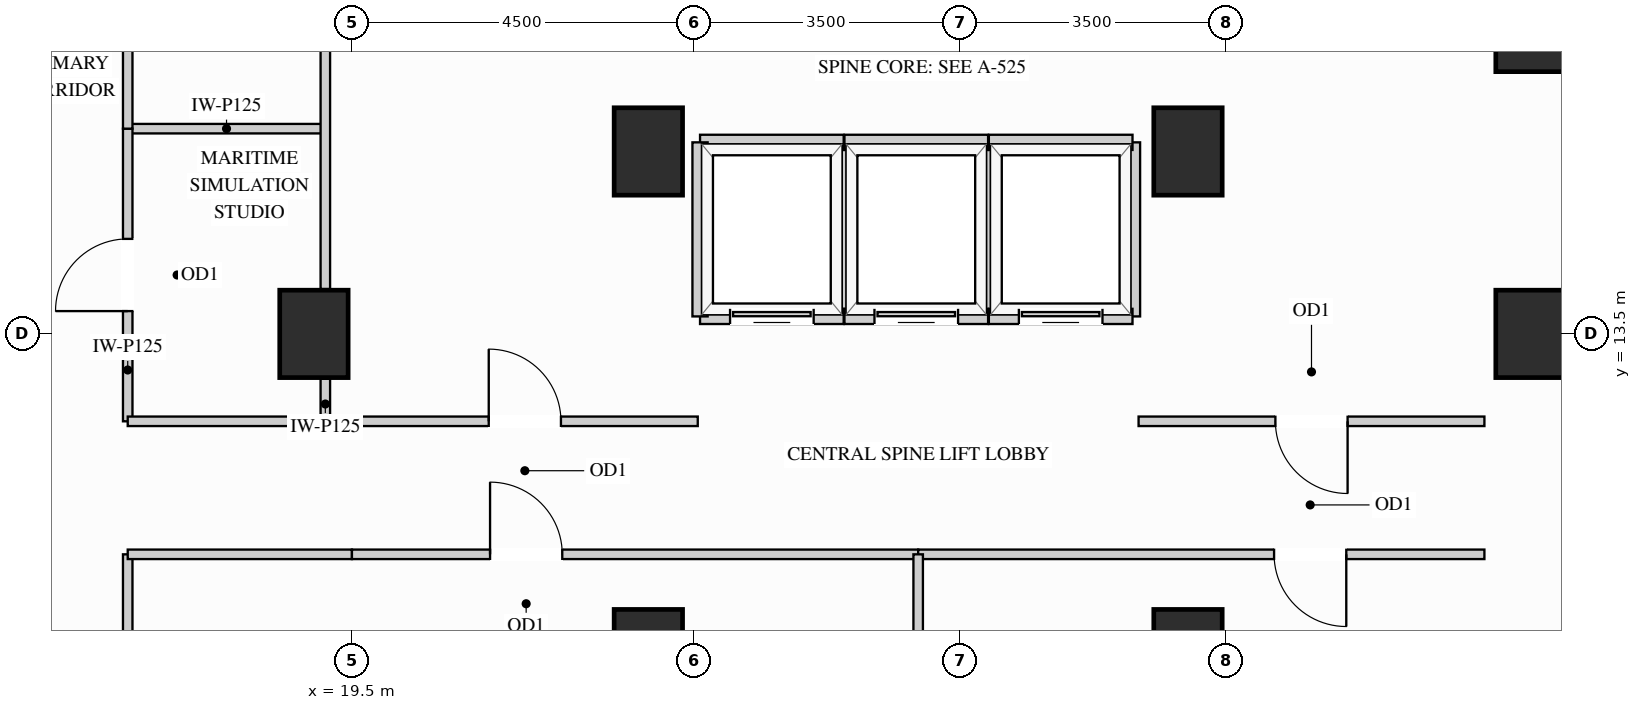
"""IFC4 building model, lengths in metres.
Left out: names, types, materials, properties, quantities, classifications, styles, units other than length and angle.
Written with IfcOpenShell. Run it as: python <this file> out.ifc"""

import sys

from ifc_helpers import new_model, si_unit, direction, frame, frame_2d, origin, origin_2d, place, context, subcontext, project, spatial, rectangle, extrude, source, transform, mapped, element, fill, save


model = new_model("IFC4")
c1 = context("Model", 3, precision=1e-05, world=origin(), true_north=direction((0.0, 1.0)))
c2 = subcontext(c1, "Body", "Model", "MODEL_VIEW")
j1 = project(units=[si_unit("LENGTHUNIT", "METRE"), si_unit("PLANEANGLEUNIT", "RADIAN")], contexts=[c1])
p1 = place(None, origin())
s1 = spatial("IfcSite", under=j1, at=p1, CompositionType="ELEMENT")
p2 = place(p1, origin())
s2 = spatial("IfcBuilding", under=s1, at=p2, CompositionType="ELEMENT")
p3 = place(p2, frame((0.0, 0.0, 127.8)))
s3 = spatial("IfcBuildingStorey", under=s2, at=p3, CompositionType="ELEMENT", Elevation=127.8)
m1 = source(origin(), c2, "Body", "SweptSolid", [
    extrude(rectangle(XDim=0.9, YDim=0.9, at=origin_2d()), origin(), (0.0, 0.0, 1.0), 3.38),
])
p4 = place(p3, frame((35.0, 17.4, 0.0), z_axis=(0.0, 0.0, 1.0), x_axis=(1.0, 0.0, 0.0)))
e1 = element("IfcColumn", 1, at=p4, inside=s3, PredefinedType="COLUMN", context=c2, shape_type="MappedRepresentation", body=[
    mapped(m1, transform((0.0, 0.0, 0.0), x_axis=(1.0, 0.0, 0.0), y_axis=(0.0, 1.0, 0.0), z_axis=(0.0, 0.0, 1.0))),
])
m2 = source(origin(), c2, "Body", "SweptSolid", [
    extrude(rectangle(XDim=0.9, YDim=1.15, at=origin_2d()), origin(), (0.0, 0.0, 1.0), 3.38),
])
for number, where, z_axis, x_axis in (
    (2, (19.0, 13.5, 0.0), (0.0, 0.0, 1.0), (1.0, 0.0, 0.0)),
    (3, (35.0, 13.5, 0.0), (0.0, 0.0, 1.0), (1.0, 0.0, 0.0)),
    (4, (23.4, 15.9, 0.0), (0.0, 0.0, 1.0), (1.0, 0.0, 0.0)),
    (5, (23.4, 9.3, 0.0), (0.0, 0.0, 1.0), (1.0, 0.0, 0.0)),
    (6, (30.5, 15.9, 0.0), (0.0, 0.0, 1.0), (1.0, 0.0, 0.0)),
    (7, (30.5, 9.3, 0.0), (0.0, 0.0, 1.0), (1.0, 0.0, 0.0)),
):
    element("IfcColumn", number, at=place(p3, frame(where, z_axis=z_axis, x_axis=x_axis)), inside=s3, PredefinedType="COLUMN", context=c2, shape_type="MappedRepresentation", body=[
        mapped(m2, transform((0.0, 0.0, 0.0), x_axis=(1.0, 0.0, 0.0), y_axis=(0.0, 1.0, 0.0), z_axis=(0.0, 0.0, 1.0))),
    ])
m3 = source(origin(), c2, "Body", "SweptSolid", [
    extrude(rectangle(XDim=2.6, YDim=0.125, at=frame_2d((1.3, 0.0))), origin(), (0.0, 0.0, 1.0), 3.365),
])
p5 = place(p3, frame((16.55, 16.2, 0.0), z_axis=(0.0, 0.0, 1.0), x_axis=(1.0, 0.0, 0.0)))
e8 = element("IfcWall", 8, at=p5, inside=s3, PredefinedType="PARTITIONING", context=c2, shape_type="MappedRepresentation", body=[
    mapped(m3, transform((0.0, 0.0, 0.0), x_axis=(1.0, 0.0, 0.0), y_axis=(0.0, 1.0, 0.0), z_axis=(0.0, 0.0, 1.0))),
])
m4 = source(origin(), c2, "Body", "SweptSolid", [
    extrude(rectangle(XDim=0.56, YDim=0.125, at=frame_2d((0.28, 0.0))), origin(), (0.0, 0.0, 1.0), 2.677),
])
p6 = place(p3, frame((19.15, 12.35, 0.0), z_axis=(0.0, 0.0, 1.0), x_axis=(0.0, 1.0, 0.0)))
e9 = element("IfcWall", 9, at=p6, inside=s3, PredefinedType="PARTITIONING", context=c2, shape_type="MappedRepresentation", body=[
    mapped(m4, transform((0.0, 0.0, 0.0), x_axis=(1.0, 0.0, 0.0), y_axis=(0.0, 1.0, 0.0), z_axis=(0.0, 0.0, 1.0))),
])
m5 = source(origin(), c2, "Body", "SweptSolid", [
    extrude(rectangle(XDim=3.32, YDim=0.125, at=frame_2d((1.66, 0.0))), origin(), (0.0, 0.0, 1.0), 2.677),
])
p7 = place(p3, frame((19.15, 14.09, 0.0), z_axis=(0.0, 0.0, 1.0), x_axis=(0.0, 1.0, 0.0)))
e10 = element("IfcWall", 10, at=p7, inside=s3, PredefinedType="PARTITIONING", context=c2, shape_type="MappedRepresentation", body=[
    mapped(m5, transform((0.0, 0.0, 0.0), x_axis=(1.0, 0.0, 0.0), y_axis=(0.0, 1.0, 0.0), z_axis=(0.0, 0.0, 1.0))),
])
p8 = place(p3, frame((16.55, 12.35, 0.0), z_axis=(0.0, 0.0, 1.0), x_axis=(0.0, 1.0, 0.0)))
e11 = element("IfcWall", 11, at=p8, inside=s3, PredefinedType="PARTITIONING", context=c2, shape_type="SweptSolid", body=[
    extrude(rectangle(XDim=3.85, YDim=0.125, at=frame_2d((1.925, 0.0))), origin(), (0.0, 0.0, 1.0), 3.365),
])
p9 = place(p8, frame((1.45, 0.0, 0.0)))
e12 = element("IfcOpeningElement", 12, at=p9, cuts=e11, PredefinedType="OPENING", context=c2, shape_type="SweptSolid", body=[
    extrude(rectangle(XDim=0.95, YDim=2.15, at=frame_2d((0.475, 1.075))), frame((0.0, 0.073, 0.0), z_axis=(0.0, -1.0, 0.0), x_axis=(1.0, 0.0, 0.0)), (0.0, 0.0, 1.0), 0.145),
])
p10 = place(p3, frame((16.55, 16.2, 0.0), z_axis=(0.0, 0.0, 1.0), x_axis=(0.0, 1.0, 0.0)))
e13 = element("IfcWall", 13, at=p10, inside=s3, PredefinedType="PARTITIONING", context=c2, shape_type="SweptSolid", body=[
    extrude(rectangle(XDim=7.15, YDim=0.125, at=frame_2d((3.575, 0.0))), origin(), (0.0, 0.0, 1.0), 3.365),
])
p11 = place(p10, frame((3.1, 0.0, 0.0)))
e14 = element("IfcOpeningElement", 14, at=p11, cuts=e13, PredefinedType="OPENING", context=c2, shape_type="SweptSolid", body=[
    extrude(rectangle(XDim=0.95, YDim=2.15, at=frame_2d((0.475, 1.075))), frame((0.0, 0.073, 0.0), z_axis=(0.0, -1.0, 0.0), x_axis=(1.0, 0.0, 0.0)), (0.0, 0.0, 1.0), 0.145),
])
p12 = place(p3, frame((16.55, 4.65, 0.0), z_axis=(0.0, 0.0, 1.0), x_axis=(0.0, 1.0, 0.0)))
e15 = element("IfcWall", 15, at=p12, inside=s3, PredefinedType="PARTITIONING", context=c2, shape_type="SweptSolid", body=[
    extrude(rectangle(XDim=5.95, YDim=0.125, at=frame_2d((2.975, 0.0))), origin(), (0.0, 0.0, 1.0), 3.365),
])
p13 = place(p12, frame((2.5, 0.0, 0.0)))
e16 = element("IfcOpeningElement", 16, at=p13, cuts=e15, PredefinedType="OPENING", context=c2, shape_type="SweptSolid", body=[
    extrude(rectangle(XDim=0.95, YDim=2.15, at=frame_2d((0.475, 1.075))), frame((0.0, 0.073, 0.0), z_axis=(0.0, -1.0, 0.0), x_axis=(1.0, 0.0, 0.0)), (0.0, 0.0, 1.0), 0.145),
])
p14 = place(p3, frame((29.85, 12.35, 0.0), z_axis=(0.0, 0.0, 1.0), x_axis=(1.0, 0.0, 0.0)))
e17 = element("IfcWall", 17, at=p14, inside=s3, PredefinedType="PARTITIONING", context=c2, shape_type="SweptSolid", body=[
    extrude(rectangle(XDim=4.55, YDim=0.125, at=frame_2d((2.275, 0.0))), origin(), (0.0, 0.0, 1.0), 3.365),
])
p15 = place(p14, frame((1.8, 0.0, 0.0)))
e18 = element("IfcOpeningElement", 18, at=p15, cuts=e17, PredefinedType="OPENING", context=c2, shape_type="SweptSolid", body=[
    extrude(rectangle(XDim=0.95, YDim=2.15, at=frame_2d((0.475, 1.075))), frame((0.0, 0.073, 0.0), z_axis=(0.0, -1.0, 0.0), x_axis=(1.0, 0.0, 0.0)), (0.0, 0.0, 1.0), 0.145),
])
m6 = source(origin(), c2, "Body", "SweptSolid", [
    extrude(rectangle(XDim=2.95, YDim=0.125, at=frame_2d((1.475, 0.0))), origin(), (0.0, 0.0, 1.0), 3.365),
])
p16 = place(p3, frame((16.55, 12.35, 0.0), z_axis=(0.0, 0.0, 1.0), x_axis=(1.0, 0.0, 0.0)))
e19 = element("IfcWall", 19, at=p16, inside=s3, PredefinedType="PARTITIONING", context=c2, shape_type="MappedRepresentation", body=[
    mapped(m6, transform((0.0, 0.0, 0.0), x_axis=(1.0, 0.0, 0.0), y_axis=(0.0, 1.0, 0.0), z_axis=(0.0, 0.0, 1.0))),
])
p17 = place(p3, frame((19.5, 12.35, 0.0), z_axis=(0.0, 0.0, 1.0), x_axis=(1.0, 0.0, 0.0)))
e20 = element("IfcWall", 20, at=p17, inside=s3, PredefinedType="PARTITIONING", context=c2, shape_type="SweptSolid", body=[
    extrude(rectangle(XDim=4.55, YDim=0.125, at=frame_2d((2.275, 0.0))), origin(), (0.0, 0.0, 1.0), 3.365),
])
p18 = place(p17, frame((1.8, 0.0, 0.0)))
e21 = element("IfcOpeningElement", 21, at=p18, cuts=e20, PredefinedType="OPENING", context=c2, shape_type="SweptSolid", body=[
    extrude(rectangle(XDim=0.95, YDim=2.15, at=frame_2d((0.475, 1.075))), frame((0.0, 0.073, 0.0), z_axis=(0.0, -1.0, 0.0), x_axis=(1.0, 0.0, 0.0)), (0.0, 0.0, 1.0), 0.145),
])
p19 = place(p3, frame((16.55, 10.6, 0.0), z_axis=(0.0, 0.0, 1.0), x_axis=(1.0, 0.0, 0.0)))
e22 = element("IfcWall", 22, at=p19, inside=s3, PredefinedType="PARTITIONING", context=c2, shape_type="MappedRepresentation", body=[
    mapped(m6, transform((0.0, 0.0, 0.0), x_axis=(1.0, 0.0, 0.0), y_axis=(0.0, 1.0, 0.0), z_axis=(0.0, 0.0, 1.0))),
])
p20 = place(p3, frame((19.5, 10.6, 0.0), z_axis=(0.0, 0.0, 1.0), x_axis=(1.0, 0.0, 0.0)))
e23 = element("IfcWall", 23, at=p20, inside=s3, PredefinedType="PARTITIONING", context=c2, shape_type="SweptSolid", body=[
    extrude(rectangle(XDim=7.45, YDim=0.125, at=frame_2d((3.725, 0.0))), origin(), (0.0, 0.0, 1.0), 3.365),
])
p21 = place(p20, frame((1.817, 0.0, 0.0)))
e24 = element("IfcOpeningElement", 24, at=p21, cuts=e23, PredefinedType="OPENING", context=c2, shape_type="SweptSolid", body=[
    extrude(rectangle(XDim=0.95, YDim=2.15, at=frame_2d((0.475, 1.075))), frame((0.0, 0.073, 0.0), z_axis=(0.0, -1.0, 0.0), x_axis=(1.0, 0.0, 0.0)), (0.0, 0.0, 1.0), 0.145),
])
p22 = place(p3, frame((26.95, 10.6, 0.0), z_axis=(0.0, 0.0, 1.0), x_axis=(1.0, 0.0, 0.0)))
e25 = element("IfcWall", 25, at=p22, inside=s3, PredefinedType="PARTITIONING", context=c2, shape_type="SweptSolid", body=[
    extrude(rectangle(XDim=7.45, YDim=0.125, at=frame_2d((3.725, 0.0))), origin(), (0.0, 0.0, 1.0), 3.365),
])
p23 = place(p22, frame((4.683, 0.0, 0.0)))
e26 = element("IfcOpeningElement", 26, at=p23, cuts=e25, PredefinedType="OPENING", context=c2, shape_type="SweptSolid", body=[
    extrude(rectangle(XDim=0.95, YDim=2.15, at=frame_2d((0.475, 1.075))), frame((0.0, 0.073, 0.0), z_axis=(0.0, -1.0, 0.0), x_axis=(1.0, 0.0, 0.0)), (0.0, 0.0, 1.0), 0.145),
])
m7 = source(origin(), c2, "Body", "SweptSolid", [
    extrude(rectangle(XDim=1.748, YDim=0.125, at=frame_2d((0.874, 0.0))), origin(), (0.0, 0.0, 1.0), 3.365),
])
p24 = place(p3, frame((26.95, 8.852, 0.0), z_axis=(0.0, 0.0, 1.0), x_axis=(0.0, 1.0, 0.0)))
e27 = element("IfcWall", 27, at=p24, inside=s3, PredefinedType="PARTITIONING", context=c2, shape_type="MappedRepresentation", body=[
    mapped(m7, transform((0.0, 0.0, 0.0), x_axis=(1.0, 0.0, 0.0), y_axis=(0.0, 1.0, 0.0), z_axis=(0.0, 0.0, 1.0))),
])
m8 = source(origin(), c2, "Body", "SweptSolid", [
    extrude(rectangle(XDim=2.29, YDim=0.2, at=frame_2d((1.145, 0.0))), origin(), (0.0, 0.0, 1.0), 3.365),
])
p25 = place(p3, frame((25.97, 13.73, 0.0), z_axis=(0.0, 0.0, 1.0), x_axis=(0.0, 1.0, 0.0)))
e28 = element("IfcWall", 28, at=p25, inside=s3, PredefinedType="PARTITIONING", context=c2, shape_type="MappedRepresentation", body=[
    mapped(m8, transform((0.0, 0.0, 0.0), x_axis=(1.0, 0.0, 0.0), y_axis=(0.0, 1.0, 0.0), z_axis=(0.0, 0.0, 1.0))),
])
m9 = source(origin(), c2, "Body", "SweptSolid", [
    extrude(rectangle(XDim=1.89, YDim=0.2, at=frame_2d((0.945, 0.0))), origin(), (0.0, 0.0, 1.0), 2.677),
])
p26 = place(p3, frame((24.08, 16.02, 0.0), z_axis=(0.0, 0.0, 1.0), x_axis=(1.0, 0.0, 0.0)))
e29 = element("IfcWall", 29, at=p26, inside=s3, PredefinedType="PARTITIONING", context=c2, shape_type="MappedRepresentation", body=[
    mapped(m9, transform((0.0, 0.0, 0.0), x_axis=(1.0, 0.0, 0.0), y_axis=(0.0, 1.0, 0.0), z_axis=(0.0, 0.0, 1.0))),
])
p27 = place(p3, frame((24.08, 13.73, 0.0), z_axis=(0.0, 0.0, 1.0), x_axis=(1.0, 0.0, 0.0)))
e30 = element("IfcWall", 30, at=p27, inside=s3, PredefinedType="PARTITIONING", context=c2, shape_type="SweptSolid", body=[
    extrude(rectangle(XDim=1.89, YDim=0.2, at=frame_2d((0.945, 0.0))), origin(), (0.0, 0.0, 1.0), 2.446),
])
p28 = place(p27, frame((0.395, 0.0, 0.0)))
e31 = element("IfcOpeningElement", 31, at=p28, cuts=e30, PredefinedType="OPENING", context=c2, shape_type="SweptSolid", body=[
    extrude(rectangle(XDim=1.1, YDim=2.2, at=frame_2d((0.55, 1.1))), frame((0.0, 0.11, 0.0), z_axis=(0.0, -1.0, 0.0), x_axis=(1.0, 0.0, 0.0)), (0.0, 0.0, 1.0), 0.22),
])
for number, where, z_axis, x_axis in (
    (32, (24.08, 13.73, 0.0), (0.0, 0.0, 1.0), (0.0, 1.0, 0.0)),
    (33, (27.87, 13.73, 0.0), (0.0, 0.0, 1.0), (0.0, 1.0, 0.0)),
):
    element("IfcWall", number, at=place(p3, frame(where, z_axis=z_axis, x_axis=x_axis)), inside=s3, PredefinedType="PARTITIONING", context=c2, shape_type="MappedRepresentation", body=[
        mapped(m8, transform((0.0, 0.0, 0.0), x_axis=(1.0, 0.0, 0.0), y_axis=(0.0, 1.0, 0.0), z_axis=(0.0, 0.0, 1.0))),
    ])
m10 = source(origin(), c2, "Body", "SweptSolid", [
    extrude(rectangle(XDim=1.89, YDim=0.2, at=frame_2d((0.945, 0.0))), origin(), (0.0, 0.0, 1.0), 2.677),
])
p29 = place(p3, frame((25.98, 16.02, 0.0), z_axis=(0.0, 0.0, 1.0), x_axis=(1.0, 0.0, 0.0)))
e34 = element("IfcWall", 34, at=p29, inside=s3, PredefinedType="PARTITIONING", context=c2, shape_type="MappedRepresentation", body=[
    mapped(m10, transform((0.0, 0.0, 0.0), x_axis=(1.0, 0.0, 0.0), y_axis=(0.0, 1.0, 0.0), z_axis=(0.0, 0.0, 1.0))),
])
p30 = place(p3, frame((25.98, 13.73, 0.0), z_axis=(0.0, 0.0, 1.0), x_axis=(1.0, 0.0, 0.0)))
e35 = element("IfcWall", 35, at=p30, inside=s3, PredefinedType="PARTITIONING", context=c2, shape_type="SweptSolid", body=[
    extrude(rectangle(XDim=1.89, YDim=0.2, at=frame_2d((0.945, 0.0))), origin(), (0.0, 0.0, 1.0), 2.446),
])
p31 = place(p30, frame((0.395, 0.0, 0.0)))
e36 = element("IfcOpeningElement", 36, at=p31, cuts=e35, PredefinedType="OPENING", context=c2, shape_type="SweptSolid", body=[
    extrude(rectangle(XDim=1.1, YDim=2.2, at=frame_2d((0.55, 1.1))), frame((0.0, 0.11, 0.0), z_axis=(0.0, -1.0, 0.0), x_axis=(1.0, 0.0, 0.0)), (0.0, 0.0, 1.0), 0.22),
])
p32 = place(p3, frame((29.77, 13.73, 0.0), z_axis=(0.0, 0.0, 1.0), x_axis=(0.0, 1.0, 0.0)))
e37 = element("IfcWall", 37, at=p32, inside=s3, PredefinedType="PARTITIONING", context=c2, shape_type="MappedRepresentation", body=[
    mapped(m8, transform((0.0, 0.0, 0.0), x_axis=(1.0, 0.0, 0.0), y_axis=(0.0, 1.0, 0.0), z_axis=(0.0, 0.0, 1.0))),
])
p33 = place(p3, frame((27.88, 16.02, 0.0), z_axis=(0.0, 0.0, 1.0), x_axis=(1.0, 0.0, 0.0)))
e38 = element("IfcWall", 38, at=p33, inside=s3, PredefinedType="PARTITIONING", context=c2, shape_type="MappedRepresentation", body=[
    mapped(m10, transform((0.0, 0.0, 0.0), x_axis=(1.0, 0.0, 0.0), y_axis=(0.0, 1.0, 0.0), z_axis=(0.0, 0.0, 1.0))),
])
p34 = place(p3, frame((27.88, 13.73, 0.0), z_axis=(0.0, 0.0, 1.0), x_axis=(1.0, 0.0, 0.0)))
e39 = element("IfcWall", 39, at=p34, inside=s3, PredefinedType="PARTITIONING", context=c2, shape_type="SweptSolid", body=[
    extrude(rectangle(XDim=1.89, YDim=0.2, at=frame_2d((0.945, 0.0))), origin(), (0.0, 0.0, 1.0), 2.446),
])
p35 = place(p34, frame((0.395, 0.0, 0.0)))
e40 = element("IfcOpeningElement", 40, at=p35, cuts=e39, PredefinedType="OPENING", context=c2, shape_type="SweptSolid", body=[
    extrude(rectangle(XDim=1.1, YDim=2.2, at=frame_2d((0.55, 1.1))), frame((0.0, 0.11, 0.0), z_axis=(0.0, -1.0, 0.0), x_axis=(1.0, 0.0, 0.0)), (0.0, 0.0, 1.0), 0.22),
])
m11 = source(origin(), c2, "Body", "SweptSolid", [
    extrude(rectangle(XDim=1.1, YDim=2.2, at=frame_2d((0.55, 1.1))), frame((0.0, 0.025, 0.0), z_axis=(0.0, -1.0, 0.0), x_axis=(1.0, 0.0, 0.0)), (0.0, 0.0, 1.0), 0.05),
])
p36 = place(p28, origin())
e41 = element("IfcDoor", 41, at=p36, inside=s3, OperationType="SLIDING_TO_LEFT", PredefinedType="DOOR", context=c2, shape_type="MappedRepresentation", body=[
    mapped(m11, transform((0.0, 0.0, 0.0), x_axis=(1.0, 0.0, 0.0), y_axis=(0.0, 1.0, 0.0), z_axis=(0.0, 0.0, 1.0))),
])
fill(e31, e41)
p37 = place(p31, origin())
e42 = element("IfcDoor", 42, at=p37, inside=s3, OperationType="SLIDING_TO_LEFT", PredefinedType="DOOR", context=c2, shape_type="MappedRepresentation", body=[
    mapped(m11, transform((0.0, 0.0, 0.0), x_axis=(1.0, 0.0, 0.0), y_axis=(0.0, 1.0, 0.0), z_axis=(0.0, 0.0, 1.0))),
])
fill(e36, e42)
p38 = place(p35, origin())
e43 = element("IfcDoor", 43, at=p38, inside=s3, OperationType="SLIDING_TO_LEFT", PredefinedType="DOOR", context=c2, shape_type="MappedRepresentation", body=[
    mapped(m11, transform((0.0, 0.0, 0.0), x_axis=(1.0, 0.0, 0.0), y_axis=(0.0, 1.0, 0.0), z_axis=(0.0, 0.0, 1.0))),
])
fill(e40, e43)
m12 = source(origin(), c2, "Body", "SweptSolid", [
    extrude(rectangle(XDim=0.95, YDim=2.15, at=frame_2d((0.475, 1.075))), frame((0.0, 0.025, 0.0), z_axis=(0.0, -1.0, 0.0), x_axis=(1.0, 0.0, 0.0)), (0.0, 0.0, 1.0), 0.05),
])
p39 = place(p9, origin())
e44 = element("IfcDoor", 44, at=p39, inside=s3, OperationType="SINGLE_SWING_LEFT", PredefinedType="DOOR", context=c2, shape_type="MappedRepresentation", body=[
    mapped(m12, transform((0.0, 0.0, 0.0), x_axis=(1.0, 0.0, 0.0), y_axis=(0.0, 1.0, 0.0), z_axis=(0.0, 0.0, 1.0))),
])
fill(e12, e44)
p40 = place(p18, origin())
e45 = element("IfcDoor", 45, at=p40, inside=s3, OperationType="SINGLE_SWING_LEFT", PredefinedType="DOOR", context=c2, shape_type="MappedRepresentation", body=[
    mapped(m12, transform((0.0, 0.0, 0.0), x_axis=(1.0, 0.0, 0.0), y_axis=(0.0, 1.0, 0.0), z_axis=(0.0, 0.0, 1.0))),
])
fill(e21, e45)
p41 = place(p15, origin())
e46 = element("IfcDoor", 46, at=p41, inside=s3, OperationType="SINGLE_SWING_RIGHT", PredefinedType="DOOR", context=c2, shape_type="MappedRepresentation", body=[
    mapped(m12, transform((0.0, 0.0, 0.0), x_axis=(1.0, 0.0, 0.0), y_axis=(0.0, 1.0, 0.0), z_axis=(0.0, 0.0, 1.0))),
])
fill(e18, e46)
p42 = place(p21, origin())
e47 = element("IfcDoor", 47, at=p42, inside=s3, OperationType="SINGLE_SWING_LEFT", PredefinedType="DOOR", context=c2, shape_type="MappedRepresentation", body=[
    mapped(m12, transform((0.0, 0.0, 0.0), x_axis=(1.0, 0.0, 0.0), y_axis=(0.0, 1.0, 0.0), z_axis=(0.0, 0.0, 1.0))),
])
fill(e24, e47)
p43 = place(p23, origin())
e48 = element("IfcDoor", 48, at=p43, inside=s3, OperationType="SINGLE_SWING_RIGHT", PredefinedType="DOOR", context=c2, shape_type="MappedRepresentation", body=[
    mapped(m12, transform((0.0, 0.0, 0.0), x_axis=(1.0, 0.0, 0.0), y_axis=(0.0, 1.0, 0.0), z_axis=(0.0, 0.0, 1.0))),
])
fill(e26, e48)
save(model, sys.argv[1])
